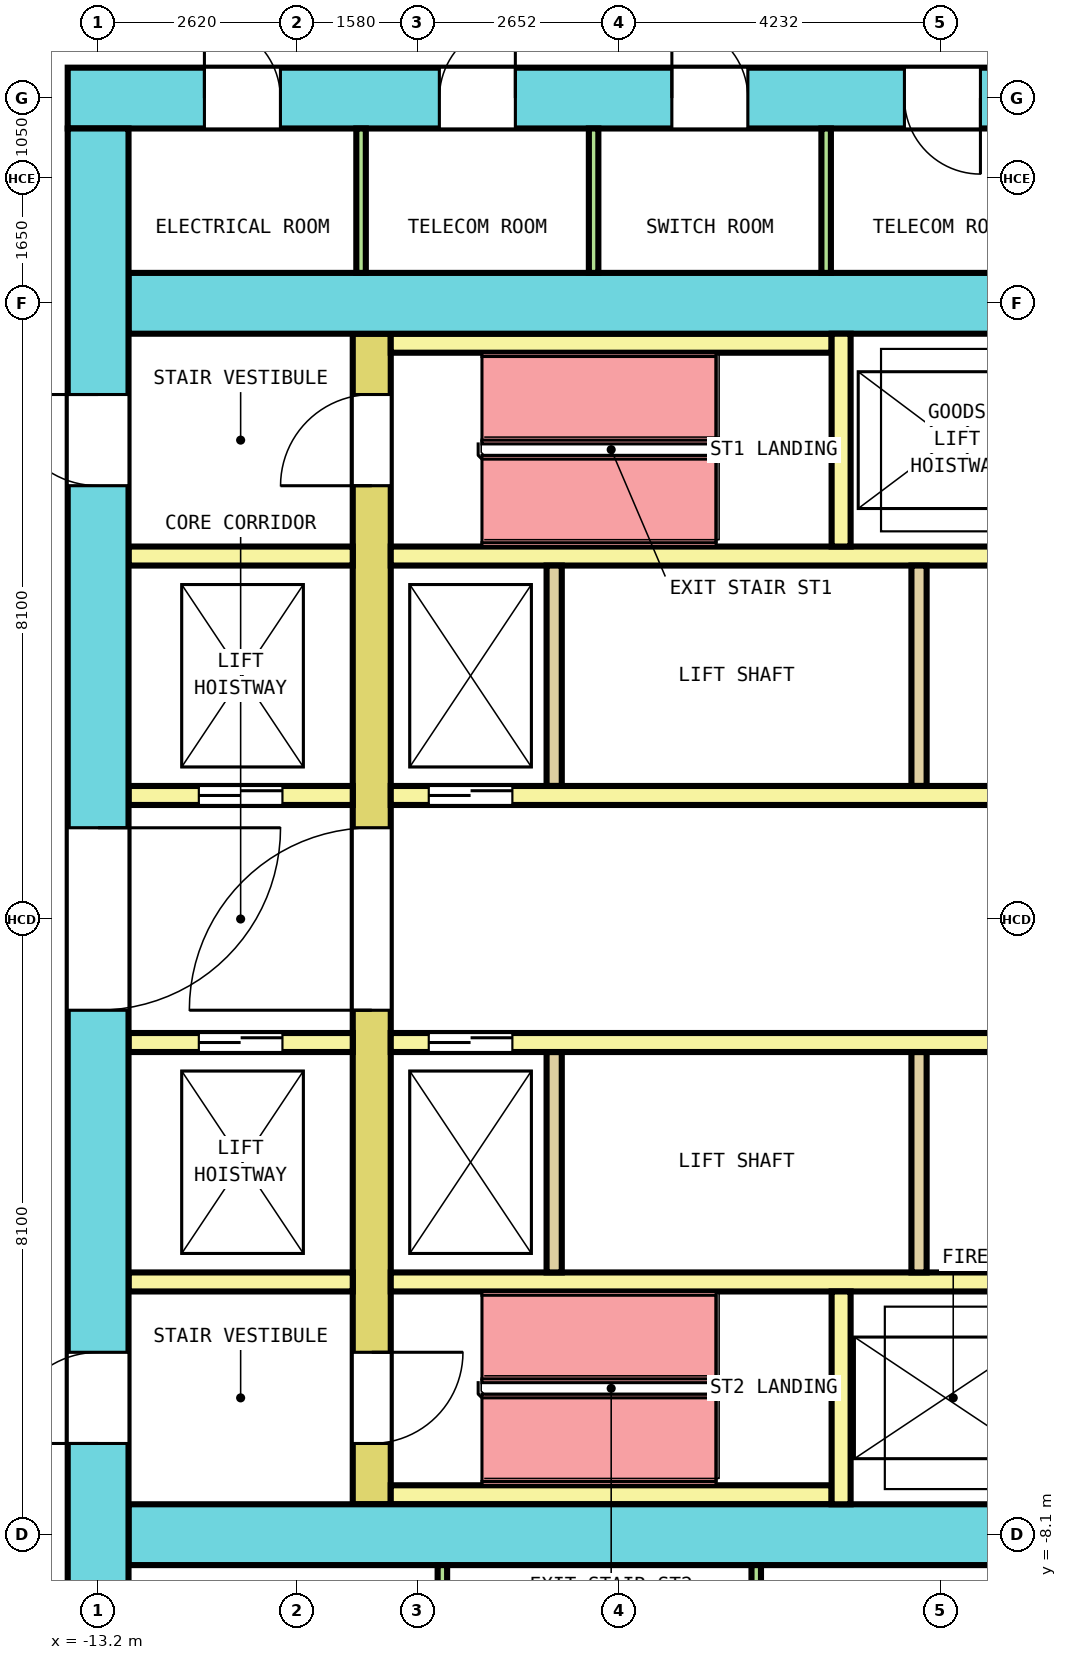
"""IFC4 building model, lengths in metres.
Left out: names, types, materials, properties, quantities, classifications, styles, units other than length and angle.
Written with IfcOpenShell. Run it as: python <this file> out.ifc"""

import sys

from ifc_helpers import new_model, si_unit, direction, frame, frame_2d, origin, place, context, subcontext, project, spatial, rectangle, extrude, element, fill, save


model = new_model("IFC4")
c1 = context("Model", 3, precision=1e-05, world=origin(), true_north=direction((0.0, 1.0)))
c2 = subcontext(c1, "Body", "Model", "MODEL_VIEW")
j1 = project(units=[si_unit("LENGTHUNIT", "METRE"), si_unit("PLANEANGLEUNIT", "RADIAN")], contexts=[c1])
p1 = place(None, origin())
s1 = spatial("IfcSite", under=j1, at=p1, CompositionType="ELEMENT")
p2 = place(p1, origin())
s2 = spatial("IfcBuilding", under=s1, at=p2, CompositionType="ELEMENT")
p3 = place(p2, frame((0.0, 0.0, 80.8)))
s3 = spatial("IfcBuildingStorey", under=s2, at=p3, CompositionType="ELEMENT", Elevation=80.8)
p4 = place(p3, frame((-13.6, 10.8, 0.0), z_axis=(0.0, 0.0, 1.0), x_axis=(1.0, 0.0, 0.0)))
e1 = element("IfcWall", 1, at=p4, inside=s3, PredefinedType="SHEAR", context=c2, shape_type="SweptSolid", body=[
    extrude(rectangle(XDim=27.2, YDim=0.8, at=frame_2d((13.6, 0.0))), origin(), (0.0, 0.0, 1.0), 4.1),
])
p5 = place(p4, frame((1.798, 0.0, 0.0)))
e2 = element("IfcOpeningElement", 2, at=p5, cuts=e1, PredefinedType="OPENING", context=c2, shape_type="SweptSolid", body=[
    extrude(rectangle(XDim=1.0, YDim=2.1, at=frame_2d((0.5, 1.05))), frame((0.0, 0.41, 0.0), z_axis=(0.0, -1.0, 0.0), x_axis=(1.0, 0.0, 0.0)), (0.0, 0.0, 1.0), 0.82),
])
p6 = place(p4, frame((4.889, 0.0, 0.0)))
e3 = element("IfcOpeningElement", 3, at=p6, cuts=e1, PredefinedType="OPENING", context=c2, shape_type="SweptSolid", body=[
    extrude(rectangle(XDim=1.0, YDim=2.1, at=frame_2d((0.5, 1.05))), frame((0.0, 0.41, 0.0), z_axis=(0.0, -1.0, 0.0), x_axis=(1.0, 0.0, 0.0)), (0.0, 0.0, 1.0), 0.82),
])
p7 = place(p4, frame((7.948, 0.0, 0.0)))
e4 = element("IfcOpeningElement", 4, at=p7, cuts=e1, PredefinedType="OPENING", context=c2, shape_type="SweptSolid", body=[
    extrude(rectangle(XDim=1.0, YDim=2.1, at=frame_2d((0.5, 1.05))), frame((0.0, 0.41, 0.0), z_axis=(0.0, -1.0, 0.0), x_axis=(1.0, 0.0, 0.0)), (0.0, 0.0, 1.0), 0.82),
])
p8 = place(p4, frame((11.008, 0.0, 0.0)))
e5 = element("IfcOpeningElement", 5, at=p8, cuts=e1, PredefinedType="OPENING", context=c2, shape_type="SweptSolid", body=[
    extrude(rectangle(XDim=1.0, YDim=2.1, at=frame_2d((0.5, 1.05))), frame((0.0, 0.41, 0.0), z_axis=(0.0, -1.0, 0.0), x_axis=(1.0, 0.0, 0.0)), (0.0, 0.0, 1.0), 0.82),
])
p9 = place(p4, frame((21.212, 0.0, 0.0)))
e6 = element("IfcOpeningElement", 6, at=p9, cuts=e1, PredefinedType="OPENING", context=c2, shape_type="SweptSolid", body=[
    extrude(rectangle(XDim=1.0, YDim=2.1, at=frame_2d((0.5, 1.05))), frame((0.0, 0.41, 0.0), z_axis=(0.0, -1.0, 0.0), x_axis=(1.0, 0.0, 0.0)), (0.0, 0.0, 1.0), 0.82),
])
p10 = place(p4, frame((14.525, 0.0, 0.0)))
e7 = element("IfcOpeningElement", 7, at=p10, cuts=e1, PredefinedType="OPENING", context=c2, shape_type="SweptSolid", body=[
    extrude(rectangle(XDim=1.4, YDim=2.1, at=frame_2d((0.7, 1.05))), frame((0.0, 0.41, 0.0), z_axis=(0.0, -1.0, 0.0), x_axis=(1.0, 0.0, 0.0)), (0.0, 0.0, 1.0), 0.82),
])
p11 = place(p3, frame((-13.2, -10.4, 0.0), z_axis=(0.0, 0.0, 1.0), x_axis=(0.0, 1.0, 0.0)))
e8 = element("IfcWall", 8, at=p11, inside=s3, PredefinedType="SHEAR", context=c2, shape_type="SweptSolid", body=[
    extrude(rectangle(XDim=20.8, YDim=0.8, at=frame_2d((10.4, 0.0))), origin(), (0.0, 0.0, 1.0), 4.1),
])
p12 = place(p11, frame((9.2, 0.0, 0.0)))
e9 = element("IfcOpeningElement", 9, at=p12, cuts=e8, PredefinedType="OPENING", context=c2, shape_type="SweptSolid", body=[
    extrude(rectangle(XDim=2.4, YDim=2.1, at=frame_2d((1.2, 1.05))), frame((0.0, 0.41, 0.0), z_axis=(0.0, -1.0, 0.0), x_axis=(1.0, 0.0, 0.0)), (0.0, 0.0, 1.0), 0.82),
])
p13 = place(p11, frame((16.1, 0.0, 0.0)))
e10 = element("IfcOpeningElement", 10, at=p13, cuts=e8, PredefinedType="OPENING", context=c2, shape_type="SweptSolid", body=[
    extrude(rectangle(XDim=1.2, YDim=2.1, at=frame_2d((0.6, 1.05))), frame((0.0, 0.41, 0.0), z_axis=(0.0, -1.0, 0.0), x_axis=(1.0, 0.0, 0.0)), (0.0, 0.0, 1.0), 0.82),
])
p14 = place(p11, frame((3.5, 0.0, 0.0)))
e11 = element("IfcOpeningElement", 11, at=p14, cuts=e8, PredefinedType="OPENING", context=c2, shape_type="SweptSolid", body=[
    extrude(rectangle(XDim=1.2, YDim=2.1, at=frame_2d((0.6, 1.05))), frame((0.0, 0.41, 0.0), z_axis=(0.0, -1.0, 0.0), x_axis=(1.0, 0.0, 0.0)), (0.0, 0.0, 1.0), 0.82),
])
p15 = place(p3, frame((-12.8, 8.1, 0.0), z_axis=(0.0, 0.0, 1.0), x_axis=(1.0, 0.0, 0.0)))
e12 = element("IfcWall", 12, at=p15, inside=s3, PredefinedType="SHEAR", context=c2, shape_type="SweptSolid", body=[
    extrude(rectangle(XDim=25.6, YDim=0.8, at=frame_2d((12.8, 0.0))), origin(), (0.0, 0.0, 1.0), 4.1),
])
p16 = place(p15, frame((13.725, 0.0, 0.0)))
e13 = element("IfcOpeningElement", 13, at=p16, cuts=e12, PredefinedType="OPENING", context=c2, shape_type="SweptSolid", body=[
    extrude(rectangle(XDim=1.4, YDim=2.1, at=frame_2d((0.7, 1.05))), frame((0.0, 0.41, 0.0), z_axis=(0.0, -1.0, 0.0), x_axis=(1.0, 0.0, 0.0)), (0.0, 0.0, 1.0), 0.82),
])
p17 = place(p3, frame((-12.8, -8.1, 0.0), z_axis=(0.0, 0.0, 1.0), x_axis=(1.0, 0.0, 0.0)))
e14 = element("IfcWall", 14, at=p17, inside=s3, PredefinedType="SHEAR", context=c2, shape_type="SweptSolid", body=[
    extrude(rectangle(XDim=25.6, YDim=0.8, at=frame_2d((12.8, 0.0))), origin(), (0.0, 0.0, 1.0), 4.1),
])
p18 = place(p17, frame((14.35, 0.0, 0.0)))
e15 = element("IfcOpeningElement", 15, at=p18, cuts=e14, PredefinedType="OPENING", context=c2, shape_type="SweptSolid", body=[
    extrude(rectangle(XDim=1.2, YDim=2.1, at=frame_2d((0.6, 1.05))), frame((0.0, 0.41, 0.0), z_axis=(0.0, -1.0, 0.0), x_axis=(1.0, 0.0, 0.0)), (0.0, 0.0, 1.0), 0.82),
])
p19 = place(p3, frame((-9.6, -7.7, 0.0), z_axis=(0.0, 0.0, 1.0), x_axis=(0.0, 1.0, 0.0)))
e16 = element("IfcWall", 16, at=p19, inside=s3, PredefinedType="SHEAR", context=c2, shape_type="SweptSolid", body=[
    extrude(rectangle(XDim=15.4, YDim=0.5, at=frame_2d((7.7, 0.0))), origin(), (0.0, 0.0, 1.0), 4.1),
])
p20 = place(p19, frame((6.5, 0.0, 0.0)))
e17 = element("IfcOpeningElement", 17, at=p20, cuts=e16, PredefinedType="OPENING", context=c2, shape_type="SweptSolid", body=[
    extrude(rectangle(XDim=2.4, YDim=2.1, at=frame_2d((1.2, 1.05))), frame((0.0, 0.26, 0.0), z_axis=(0.0, -1.0, 0.0), x_axis=(1.0, 0.0, 0.0)), (0.0, 0.0, 1.0), 0.52),
])
p21 = place(p19, frame((13.4, 0.0, 0.0)))
e18 = element("IfcOpeningElement", 18, at=p21, cuts=e16, PredefinedType="OPENING", context=c2, shape_type="SweptSolid", body=[
    extrude(rectangle(XDim=1.2, YDim=2.1, at=frame_2d((0.6, 1.05))), frame((0.0, 0.26, 0.0), z_axis=(0.0, -1.0, 0.0), x_axis=(1.0, 0.0, 0.0)), (0.0, 0.0, 1.0), 0.52),
])
p22 = place(p19, frame((0.8, 0.0, 0.0)))
e19 = element("IfcOpeningElement", 19, at=p22, cuts=e16, PredefinedType="OPENING", context=c2, shape_type="SweptSolid", body=[
    extrude(rectangle(XDim=1.2, YDim=2.1, at=frame_2d((0.6, 1.05))), frame((0.0, 0.26, 0.0), z_axis=(0.0, -1.0, 0.0), x_axis=(1.0, 0.0, 0.0)), (0.0, 0.0, 1.0), 0.52),
])
p23 = place(p3, frame((-12.8, 1.625, 0.0), z_axis=(0.0, 0.0, 1.0), x_axis=(1.0, 0.0, 0.0)))
e20 = element("IfcWall", 20, at=p23, inside=s3, PredefinedType="SOLIDWALL", context=c2, shape_type="SweptSolid", body=[
    extrude(rectangle(XDim=2.95, YDim=0.25, at=frame_2d((1.475, 0.0))), origin(), (0.0, 0.0, 1.0), 4.1),
])
p24 = place(p23, frame((0.925, 0.0, 0.0)))
e21 = element("IfcOpeningElement", 21, at=p24, cuts=e20, PredefinedType="OPENING", context=c2, shape_type="SweptSolid", body=[
    extrude(rectangle(XDim=1.1, YDim=2.1, at=frame_2d((0.55, 1.05))), frame((0.0, 0.135, 0.0), z_axis=(0.0, -1.0, 0.0), x_axis=(1.0, 0.0, 0.0)), (0.0, 0.0, 1.0), 0.27),
])
p25 = place(p3, frame((-9.35, 1.625, 0.0), z_axis=(0.0, 0.0, 1.0), x_axis=(1.0, 0.0, 0.0)))
e22 = element("IfcWall", 22, at=p25, inside=s3, PredefinedType="SOLIDWALL", context=c2, shape_type="SweptSolid", body=[
    extrude(rectangle(XDim=18.7, YDim=0.25, at=frame_2d((9.35, 0.0))), origin(), (0.0, 0.0, 1.0), 4.1),
])
p26 = place(p25, frame((0.5, 0.0, 0.0)))
e23 = element("IfcOpeningElement", 23, at=p26, cuts=e22, PredefinedType="OPENING", context=c2, shape_type="SweptSolid", body=[
    extrude(rectangle(XDim=1.1, YDim=2.1, at=frame_2d((0.55, 1.05))), frame((0.0, 0.135, 0.0), z_axis=(0.0, -1.0, 0.0), x_axis=(1.0, 0.0, 0.0)), (0.0, 0.0, 1.0), 0.27),
])
p27 = place(p25, frame((17.1, 0.0, 0.0)))
e24 = element("IfcOpeningElement", 24, at=p27, cuts=e22, PredefinedType="OPENING", context=c2, shape_type="SweptSolid", body=[
    extrude(rectangle(XDim=1.1, YDim=2.1, at=frame_2d((0.55, 1.05))), frame((0.0, 0.135, 0.0), z_axis=(0.0, -1.0, 0.0), x_axis=(1.0, 0.0, 0.0)), (0.0, 0.0, 1.0), 0.27),
])
p28 = place(p3, frame((-12.8, 4.775, 0.0), z_axis=(0.0, 0.0, 1.0), x_axis=(1.0, 0.0, 0.0)))
e25 = element("IfcWall", 25, at=p28, inside=s3, PredefinedType="SOLIDWALL", context=c2, shape_type="SweptSolid", body=[
    extrude(rectangle(XDim=2.95, YDim=0.25, at=frame_2d((1.475, 0.0))), origin(), (0.0, 0.0, 1.0), 4.1),
])
p29 = place(p3, frame((-9.35, 4.775, 0.0), z_axis=(0.0, 0.0, 1.0), x_axis=(1.0, 0.0, 0.0)))
e26 = element("IfcWall", 26, at=p29, inside=s3, PredefinedType="SOLIDWALL", context=c2, shape_type="SweptSolid", body=[
    extrude(rectangle(XDim=18.7, YDim=0.25, at=frame_2d((9.35, 0.0))), origin(), (0.0, 0.0, 1.0), 4.1),
])
for number, where, z_axis, x_axis in (
    (27, (-7.2, 1.75, 0.0), (0.0, 0.0, 1.0), (0.0, 1.0, 0.0)),
    (28, (-2.4, 1.75, 0.0), (0.0, 0.0, 1.0), (0.0, 1.0, 0.0)),
):
    element("IfcWall", number, at=place(p3, frame(where, z_axis=z_axis, x_axis=x_axis)), inside=s3, PredefinedType="SOLIDWALL", context=c2, shape_type="SweptSolid", body=[
        extrude(rectangle(XDim=2.9, YDim=0.2, at=frame_2d((1.45, 0.0))), origin(), (0.0, 0.0, 1.0), 4.1),
    ])
p30 = place(p3, frame((-12.8, -1.625, 0.0), z_axis=(0.0, 0.0, 1.0), x_axis=(1.0, 0.0, 0.0)))
e29 = element("IfcWall", 29, at=p30, inside=s3, PredefinedType="SOLIDWALL", context=c2, shape_type="SweptSolid", body=[
    extrude(rectangle(XDim=2.95, YDim=0.25, at=frame_2d((1.475, 0.0))), origin(), (0.0, 0.0, 1.0), 4.1),
])
p31 = place(p30, frame((0.925, 0.0, 0.0)))
e30 = element("IfcOpeningElement", 30, at=p31, cuts=e29, PredefinedType="OPENING", context=c2, shape_type="SweptSolid", body=[
    extrude(rectangle(XDim=1.1, YDim=2.1, at=frame_2d((0.55, 1.05))), frame((0.0, 0.135, 0.0), z_axis=(0.0, -1.0, 0.0), x_axis=(1.0, 0.0, 0.0)), (0.0, 0.0, 1.0), 0.27),
])
p32 = place(p3, frame((-9.35, -1.625, 0.0), z_axis=(0.0, 0.0, 1.0), x_axis=(1.0, 0.0, 0.0)))
e31 = element("IfcWall", 31, at=p32, inside=s3, PredefinedType="SOLIDWALL", context=c2, shape_type="SweptSolid", body=[
    extrude(rectangle(XDim=18.7, YDim=0.25, at=frame_2d((9.35, 0.0))), origin(), (0.0, 0.0, 1.0), 4.1),
])
p33 = place(p32, frame((0.5, 0.0, 0.0)))
e32 = element("IfcOpeningElement", 32, at=p33, cuts=e31, PredefinedType="OPENING", context=c2, shape_type="SweptSolid", body=[
    extrude(rectangle(XDim=1.1, YDim=2.1, at=frame_2d((0.55, 1.05))), frame((0.0, 0.135, 0.0), z_axis=(0.0, -1.0, 0.0), x_axis=(1.0, 0.0, 0.0)), (0.0, 0.0, 1.0), 0.27),
])
p34 = place(p32, frame((17.1, 0.0, 0.0)))
e33 = element("IfcOpeningElement", 33, at=p34, cuts=e31, PredefinedType="OPENING", context=c2, shape_type="SweptSolid", body=[
    extrude(rectangle(XDim=1.1, YDim=2.1, at=frame_2d((0.55, 1.05))), frame((0.0, 0.135, 0.0), z_axis=(0.0, -1.0, 0.0), x_axis=(1.0, 0.0, 0.0)), (0.0, 0.0, 1.0), 0.27),
])
p35 = place(p3, frame((-12.8, -4.775, 0.0), z_axis=(0.0, 0.0, 1.0), x_axis=(1.0, 0.0, 0.0)))
e34 = element("IfcWall", 34, at=p35, inside=s3, PredefinedType="SOLIDWALL", context=c2, shape_type="SweptSolid", body=[
    extrude(rectangle(XDim=2.95, YDim=0.25, at=frame_2d((1.475, 0.0))), origin(), (0.0, 0.0, 1.0), 4.1),
])
p36 = place(p3, frame((-9.35, -4.775, 0.0), z_axis=(0.0, 0.0, 1.0), x_axis=(1.0, 0.0, 0.0)))
e35 = element("IfcWall", 35, at=p36, inside=s3, PredefinedType="SOLIDWALL", context=c2, shape_type="SweptSolid", body=[
    extrude(rectangle(XDim=18.7, YDim=0.25, at=frame_2d((9.35, 0.0))), origin(), (0.0, 0.0, 1.0), 4.1),
])
for number, where, z_axis, x_axis in (
    (36, (-7.2, -4.65, 0.0), (0.0, 0.0, 1.0), (0.0, 1.0, 0.0)),
    (37, (-2.4, -4.65, 0.0), (0.0, 0.0, 1.0), (0.0, 1.0, 0.0)),
):
    element("IfcWall", number, at=place(p3, frame(where, z_axis=z_axis, x_axis=x_axis)), inside=s3, PredefinedType="SOLIDWALL", context=c2, shape_type="SweptSolid", body=[
        extrude(rectangle(XDim=2.9, YDim=0.2, at=frame_2d((1.45, 0.0))), origin(), (0.0, 0.0, 1.0), 4.1),
    ])
p37 = place(p3, frame((-9.35, 7.575, 0.0), z_axis=(0.0, 0.0, 1.0), x_axis=(1.0, 0.0, 0.0)))
e38 = element("IfcWall", 38, at=p37, inside=s3, PredefinedType="SOLIDWALL", context=c2, shape_type="SweptSolid", body=[
    extrude(rectangle(XDim=5.8, YDim=0.25, at=frame_2d((2.9, 0.0))), origin(), (0.0, 0.0, 1.0), 4.1),
])
p38 = place(p3, frame((-3.425, 4.9, 0.0), z_axis=(0.0, 0.0, 1.0), x_axis=(0.0, 1.0, 0.0)))
e39 = element("IfcWall", 39, at=p38, inside=s3, PredefinedType="SOLIDWALL", context=c2, shape_type="SweptSolid", body=[
    extrude(rectangle(XDim=2.8, YDim=0.25, at=frame_2d((1.4, 0.0))), origin(), (0.0, 0.0, 1.0), 4.1),
])
p39 = place(p3, frame((-9.35, -7.575, 0.0), z_axis=(0.0, 0.0, 1.0), x_axis=(1.0, 0.0, 0.0)))
e40 = element("IfcWall", 40, at=p39, inside=s3, PredefinedType="SOLIDWALL", context=c2, shape_type="SweptSolid", body=[
    extrude(rectangle(XDim=5.8, YDim=0.25, at=frame_2d((2.9, 0.0))), origin(), (0.0, 0.0, 1.0), 4.1),
])
p40 = place(p3, frame((-3.425, -7.7, 0.0), z_axis=(0.0, 0.0, 1.0), x_axis=(0.0, 1.0, 0.0)))
e41 = element("IfcWall", 41, at=p40, inside=s3, PredefinedType="SOLIDWALL", context=c2, shape_type="SweptSolid", body=[
    extrude(rectangle(XDim=2.8, YDim=0.25, at=frame_2d((1.4, 0.0))), origin(), (0.0, 0.0, 1.0), 4.1),
])
for number, where, z_axis, x_axis in (
    (42, (-9.74, 8.5, 0.0), (0.0, 0.0, 1.0), (0.0, 1.0, 0.0)),
    (43, (-6.681, 8.5, 0.0), (0.0, 0.0, 1.0), (0.0, 1.0, 0.0)),
    (44, (-3.622, 8.5, 0.0), (0.0, 0.0, 1.0), (0.0, 1.0, 0.0)),
    (45, (-8.671, -10.4, 0.0), (0.0, 0.0, 1.0), (0.0, 1.0, 0.0)),
    (46, (-4.542, -10.4, 0.0), (0.0, 0.0, 1.0), (0.0, 1.0, 0.0)),
):
    element("IfcWall", number, at=place(p3, frame(where, z_axis=z_axis, x_axis=x_axis)), inside=s3, PredefinedType="PARTITIONING", context=c2, shape_type="SweptSolid", body=[
        extrude(rectangle(XDim=1.9, YDim=0.125, at=frame_2d((0.95, 0.0))), origin(), (0.0, 0.0, 1.0), 4.1),
    ])
p41 = place(p24, origin())
e47 = element("IfcDoor", 47, at=p41, inside=s3, OperationType="DOUBLE_DOOR_SLIDING", PredefinedType="DOOR", context=c2, shape_type="SweptSolid", body=[
    extrude(rectangle(XDim=1.1, YDim=2.1, at=frame_2d((0.55, 1.05))), frame((0.0, 0.075, 0.0), z_axis=(0.0, -1.0, 0.0), x_axis=(1.0, 0.0, 0.0)), (0.0, 0.0, 1.0), 0.15),
])
fill(e21, e47)
p42 = place(p26, origin())
e48 = element("IfcDoor", 48, at=p42, inside=s3, OperationType="DOUBLE_DOOR_SLIDING", PredefinedType="DOOR", context=c2, shape_type="SweptSolid", body=[
    extrude(rectangle(XDim=1.1, YDim=2.1, at=frame_2d((0.55, 1.05))), frame((0.0, 0.075, 0.0), z_axis=(0.0, -1.0, 0.0), x_axis=(1.0, 0.0, 0.0)), (0.0, 0.0, 1.0), 0.15),
])
fill(e23, e48)
p43 = place(p31, origin())
e49 = element("IfcDoor", 49, at=p43, inside=s3, OperationType="DOUBLE_DOOR_SLIDING", PredefinedType="DOOR", context=c2, shape_type="SweptSolid", body=[
    extrude(rectangle(XDim=1.1, YDim=2.1, at=frame_2d((0.55, 1.05))), frame((0.0, 0.075, 0.0), z_axis=(0.0, -1.0, 0.0), x_axis=(1.0, 0.0, 0.0)), (0.0, 0.0, 1.0), 0.15),
])
fill(e30, e49)
p44 = place(p33, origin())
e50 = element("IfcDoor", 50, at=p44, inside=s3, OperationType="DOUBLE_DOOR_SLIDING", PredefinedType="DOOR", context=c2, shape_type="SweptSolid", body=[
    extrude(rectangle(XDim=1.1, YDim=2.1, at=frame_2d((0.55, 1.05))), frame((0.0, 0.075, 0.0), z_axis=(0.0, -1.0, 0.0), x_axis=(1.0, 0.0, 0.0)), (0.0, 0.0, 1.0), 0.15),
])
fill(e32, e50)
p45 = place(p20, origin())
e51 = element("IfcDoor", 51, at=p45, inside=s3, OperationType="DOUBLE_DOOR_SINGLE_SWING", PredefinedType="DOOR", context=c2, shape_type="SweptSolid", body=[
    extrude(rectangle(XDim=2.4, YDim=2.1, at=frame_2d((1.2, 1.05))), frame((0.0, 0.2, 0.0), z_axis=(0.0, -1.0, 0.0), x_axis=(1.0, 0.0, 0.0)), (0.0, 0.0, 1.0), 0.4),
])
fill(e17, e51)
p46 = place(p12, origin())
e52 = element("IfcDoor", 52, at=p46, inside=s3, OperationType="DOUBLE_DOOR_SINGLE_SWING", PredefinedType="DOOR", context=c2, shape_type="SweptSolid", body=[
    extrude(rectangle(XDim=2.4, YDim=2.1, at=frame_2d((1.2, 1.05))), frame((0.0, 0.3, 0.0), z_axis=(0.0, -1.0, 0.0), x_axis=(1.0, 0.0, 0.0)), (0.0, 0.0, 1.0), 0.6),
])
fill(e9, e52)
p47 = place(p21, origin())
e53 = element("IfcDoor", 53, at=p47, inside=s3, OperationType="SINGLE_SWING_LEFT", PredefinedType="DOOR", context=c2, shape_type="SweptSolid", body=[
    extrude(rectangle(XDim=1.2, YDim=2.1, at=frame_2d((0.6, 1.05))), frame((0.0, 0.2, 0.0), z_axis=(0.0, -1.0, 0.0), x_axis=(1.0, 0.0, 0.0)), (0.0, 0.0, 1.0), 0.4),
])
fill(e18, e53)
p48 = place(p13, origin())
e54 = element("IfcDoor", 54, at=p48, inside=s3, OperationType="SINGLE_SWING_RIGHT", PredefinedType="DOOR", context=c2, shape_type="SweptSolid", body=[
    extrude(rectangle(XDim=1.2, YDim=2.1, at=frame_2d((0.6, 1.05))), frame((0.0, 0.3, 0.0), z_axis=(0.0, -1.0, 0.0), x_axis=(1.0, 0.0, 0.0)), (0.0, 0.0, 1.0), 0.6),
])
fill(e10, e54)
p49 = place(p22, origin())
e55 = element("IfcDoor", 55, at=p49, inside=s3, OperationType="SINGLE_SWING_LEFT", PredefinedType="DOOR", context=c2, shape_type="SweptSolid", body=[
    extrude(rectangle(XDim=1.2, YDim=2.1, at=frame_2d((0.6, 1.05))), frame((0.0, 0.2, 0.0), z_axis=(0.0, -1.0, 0.0), x_axis=(1.0, 0.0, 0.0)), (0.0, 0.0, 1.0), 0.4),
])
fill(e19, e55)
p50 = place(p14, origin())
e56 = element("IfcDoor", 56, at=p50, inside=s3, OperationType="SINGLE_SWING_RIGHT", PredefinedType="DOOR", context=c2, shape_type="SweptSolid", body=[
    extrude(rectangle(XDim=1.2, YDim=2.1, at=frame_2d((0.6, 1.05))), frame((0.0, 0.3, 0.0), z_axis=(0.0, -1.0, 0.0), x_axis=(1.0, 0.0, 0.0)), (0.0, 0.0, 1.0), 0.6),
])
fill(e11, e56)
p51 = place(p5, origin())
e57 = element("IfcDoor", 57, at=p51, inside=s3, OperationType="SINGLE_SWING_RIGHT", PredefinedType="DOOR", context=c2, shape_type="SweptSolid", body=[
    extrude(rectangle(XDim=1.0, YDim=2.1, at=frame_2d((0.5, 1.05))), frame((0.0, 0.3, 0.0), z_axis=(0.0, -1.0, 0.0), x_axis=(1.0, 0.0, 0.0)), (0.0, 0.0, 1.0), 0.6),
])
fill(e2, e57)
p52 = place(p6, origin())
e58 = element("IfcDoor", 58, at=p52, inside=s3, OperationType="SINGLE_SWING_LEFT", PredefinedType="DOOR", context=c2, shape_type="SweptSolid", body=[
    extrude(rectangle(XDim=1.0, YDim=2.1, at=frame_2d((0.5, 1.05))), frame((0.0, 0.3, 0.0), z_axis=(0.0, -1.0, 0.0), x_axis=(1.0, 0.0, 0.0)), (0.0, 0.0, 1.0), 0.6),
])
fill(e3, e58)
p53 = place(p7, origin())
e59 = element("IfcDoor", 59, at=p53, inside=s3, OperationType="SINGLE_SWING_RIGHT", PredefinedType="DOOR", context=c2, shape_type="SweptSolid", body=[
    extrude(rectangle(XDim=1.0, YDim=2.1, at=frame_2d((0.5, 1.05))), frame((0.0, 0.3, 0.0), z_axis=(0.0, -1.0, 0.0), x_axis=(1.0, 0.0, 0.0)), (0.0, 0.0, 1.0), 0.6),
])
fill(e4, e59)
p54 = place(p8, origin())
e60 = element("IfcDoor", 60, at=p54, inside=s3, OperationType="SINGLE_SWING_LEFT", PredefinedType="DOOR", context=c2, shape_type="SweptSolid", body=[
    extrude(rectangle(XDim=1.0, YDim=2.1, at=frame_2d((0.5, 1.05))), frame((0.0, 0.3, 0.0), z_axis=(0.0, -1.0, 0.0), x_axis=(1.0, 0.0, 0.0)), (0.0, 0.0, 1.0), 0.6),
])
fill(e5, e60)
save(model, sys.argv[1])
